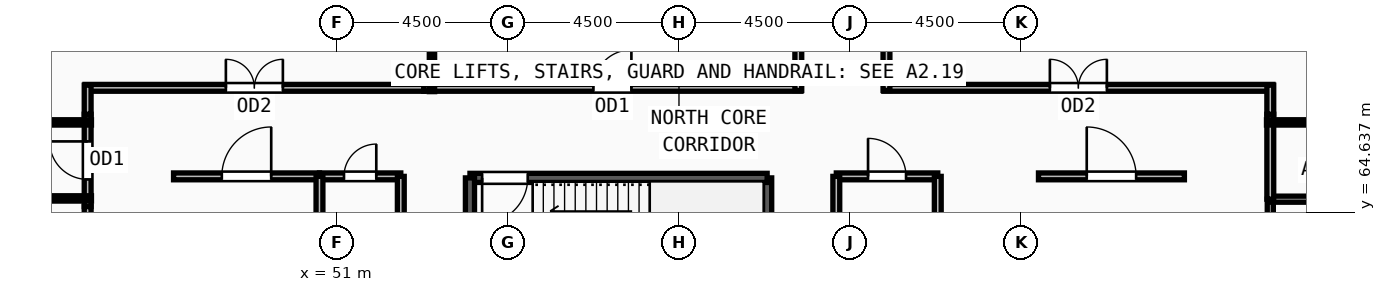
"""IFC4 building model, lengths in metres.
Left out: names, types, materials, properties, quantities, classifications, styles, units other than length and angle.
Written with IfcOpenShell. Run it as: python <this file> out.ifc"""

import sys

from ifc_helpers import new_model, si_unit, direction, frame, frame_2d, origin, place, context, subcontext, project, spatial, rectangle, extrude, source, transform, mapped, element, fill, save


model = new_model("IFC4")
c1 = context("Model", 3, precision=1e-05, world=origin(), true_north=direction((0.0, 1.0)))
c2 = subcontext(c1, "Body", "Model", "MODEL_VIEW")
j1 = project(units=[si_unit("LENGTHUNIT", "METRE"), si_unit("PLANEANGLEUNIT", "RADIAN")], contexts=[c1])
p1 = place(None, origin())
s1 = spatial("IfcSite", under=j1, at=p1, CompositionType="ELEMENT")
p2 = place(p1, origin())
s2 = spatial("IfcBuilding", under=s1, at=p2, CompositionType="ELEMENT")
p3 = place(p2, frame((0.0, 0.0, 270.0)))
s3 = spatial("IfcBuildingStorey", under=s2, at=p3, CompositionType="ELEMENT", Elevation=270.0)
p4 = place(p3, frame((62.32, 62.1, 0.0), z_axis=(0.0, 0.0, 1.0), x_axis=(0.0, 1.0, 0.0)))
e1 = element("IfcWall", 1, at=p4, inside=s3, PredefinedType="SOLIDWALL", context=c2, shape_type="SweptSolid", body=[
    extrude(rectangle(XDim=3.44, YDim=0.24, at=frame_2d((1.72, 0.0))), origin(), (0.0, 0.0, 1.0), 3.57),
])
p5 = place(p3, frame((62.32, 65.54, 0.0), z_axis=(0.0, 0.0, 1.0), x_axis=(-1.0, 0.0, 0.0)))
e2 = element("IfcWall", 2, at=p5, inside=s3, PredefinedType="SOLIDWALL", context=c2, shape_type="SweptSolid", body=[
    extrude(rectangle(XDim=7.82, YDim=0.24, at=frame_2d((3.91, 0.0))), origin(), (0.0, 0.0, 1.0), 3.57),
])
m1 = source(origin(), c2, "Body", "SweptSolid", [
    extrude(rectangle(XDim=1.2, YDim=2.2, at=frame_2d((0.6, 1.1))), frame((0.0, 0.13, 0.0), z_axis=(0.0, -1.0, 0.0), x_axis=(1.0, 0.0, 0.0)), (0.0, 0.0, 1.0), 0.26),
])
p6 = place(p5, frame((6.3, 0.0, 0.0)))
e3 = element("IfcOpeningElement", 3, at=p6, cuts=e2, PredefinedType="OPENING", context=c2, shape_type="MappedRepresentation", body=[
    mapped(m1, transform((0.0, 0.0, 0.0), x_axis=(1.0, 0.0, 0.0), y_axis=(0.0, 1.0, 0.0), z_axis=(0.0, 0.0, 1.0), scale=1.0)),
])
p7 = place(p3, frame((54.5, 65.54, 0.0), z_axis=(0.0, 0.0, 1.0), x_axis=(0.0, -1.0, 0.0)))
e4 = element("IfcWall", 4, at=p7, inside=s3, PredefinedType="SOLIDWALL", context=c2, shape_type="SweptSolid", body=[
    extrude(rectangle(XDim=3.44, YDim=0.24, at=frame_2d((1.72, 0.0))), origin(), (0.0, 0.0, 1.0), 3.57),
])
p8 = place(p3, frame((75.56, 62.24, 0.0), z_axis=(0.0, 0.0, 1.0), x_axis=(0.0, 1.0, 0.0)))
e5 = element("IfcWall", 5, at=p8, inside=s3, PredefinedType="PARTITIONING", context=c2, shape_type="SweptSolid", body=[
    extrude(rectangle(XDim=2.74, YDim=0.16, at=frame_2d((1.37, 0.0))), origin(), (0.0, 0.0, 1.0), 3.57),
])
m2 = source(origin(), c2, "Body", "SweptSolid", [
    extrude(rectangle(XDim=1.05, YDim=2.15, at=frame_2d((0.525, 1.075))), frame((0.0, 0.09, 0.0), z_axis=(0.0, -1.0, 0.0), x_axis=(1.0, 0.0, 0.0)), (0.0, 0.0, 1.0), 0.18),
])
p9 = place(p8, frame((0.845, 0.0, 0.0)))
e6 = element("IfcOpeningElement", 6, at=p9, cuts=e5, PredefinedType="OPENING", context=c2, shape_type="MappedRepresentation", body=[
    mapped(m2, transform((0.0, 0.0, 0.0), x_axis=(1.0, 0.0, 0.0), y_axis=(0.0, 1.0, 0.0), z_axis=(0.0, 0.0, 1.0), scale=1.0)),
])
p10 = place(p3, frame((50.54, 65.58, 0.0), z_axis=(0.0, 0.0, 1.0), x_axis=(1.0, 0.0, 0.0)))
e7 = element("IfcWall", 7, at=p10, inside=s3, PredefinedType="PARTITIONING", context=c2, shape_type="SweptSolid", body=[
    extrude(rectangle(XDim=2.14, YDim=0.18, at=frame_2d((1.07, 0.0))), origin(), (0.0, 0.0, 1.0), 3.57),
])
m3 = source(origin(), c2, "Body", "SweptSolid", [
    extrude(rectangle(XDim=0.85, YDim=2.1, at=frame_2d((0.425, 1.05))), frame((0.0, 0.1, 0.0), z_axis=(0.0, -1.0, 0.0), x_axis=(1.0, 0.0, 0.0)), (0.0, 0.0, 1.0), 0.2),
])
p11 = place(p10, frame((0.645, 0.0, 0.0)))
e8 = element("IfcOpeningElement", 8, at=p11, cuts=e7, PredefinedType="OPENING", context=c2, shape_type="MappedRepresentation", body=[
    mapped(m3, transform((0.0, 0.0, 0.0), x_axis=(1.0, 0.0, 0.0), y_axis=(0.0, 1.0, 0.0), z_axis=(0.0, 0.0, 1.0), scale=1.0)),
])
p12 = place(p3, frame((64.14, 65.58, 0.0), z_axis=(0.0, 0.0, 1.0), x_axis=(1.0, 0.0, 0.0)))
e9 = element("IfcWall", 9, at=p12, inside=s3, PredefinedType="PARTITIONING", context=c2, shape_type="SweptSolid", body=[
    extrude(rectangle(XDim=2.67, YDim=0.18, at=frame_2d((1.335, 0.0))), origin(), (0.0, 0.0, 1.0), 3.57),
])
m4 = source(origin(), c2, "Body", "SweptSolid", [
    extrude(rectangle(XDim=1.0, YDim=2.2, at=frame_2d((0.5, 1.1))), frame((0.0, 0.1, 0.0), z_axis=(0.0, -1.0, 0.0), x_axis=(1.0, 0.0, 0.0)), (0.0, 0.0, 1.0), 0.2),
])
p13 = place(p12, frame((0.835, 0.0, 0.0)))
e10 = element("IfcOpeningElement", 10, at=p13, cuts=e9, PredefinedType="OPENING", context=c2, shape_type="MappedRepresentation", body=[
    mapped(m4, transform((0.0, 0.0, 0.0), x_axis=(1.0, 0.0, 0.0), y_axis=(0.0, 1.0, 0.0), z_axis=(0.0, 0.0, 1.0), scale=1.0)),
])
p14 = place(p3, frame((46.7, 65.58, 0.0), z_axis=(0.0, 0.0, 1.0), x_axis=(1.0, 0.0, 0.0)))
e11 = element("IfcWall", 11, at=p14, inside=s3, PredefinedType="PARTITIONING", context=c2, shape_type="SweptSolid", body=[
    extrude(rectangle(XDim=3.84, YDim=0.18, at=frame_2d((1.92, 0.0))), origin(), (0.0, 0.0, 1.0), 3.57),
])
m5 = source(origin(), c2, "Body", "SweptSolid", [
    extrude(rectangle(XDim=1.3, YDim=2.2, at=frame_2d((0.65, 1.1))), frame((0.0, 0.1, 0.0), z_axis=(0.0, -1.0, 0.0), x_axis=(1.0, 0.0, 0.0)), (0.0, 0.0, 1.0), 0.2),
])
p15 = place(p14, frame((1.27, 0.0, 0.0)))
e12 = element("IfcOpeningElement", 12, at=p15, cuts=e11, PredefinedType="OPENING", context=c2, shape_type="MappedRepresentation", body=[
    mapped(m5, transform((0.0, 0.0, 0.0), x_axis=(1.0, 0.0, 0.0), y_axis=(0.0, 1.0, 0.0), z_axis=(0.0, 0.0, 1.0), scale=1.0)),
])
p16 = place(p3, frame((69.46, 65.58, 0.0), z_axis=(0.0, 0.0, 1.0), x_axis=(1.0, 0.0, 0.0)))
e13 = element("IfcWall", 13, at=p16, inside=s3, PredefinedType="PARTITIONING", context=c2, shape_type="SweptSolid", body=[
    extrude(rectangle(XDim=3.84, YDim=0.18, at=frame_2d((1.92, 0.0))), origin(), (0.0, 0.0, 1.0), 3.57),
])
p17 = place(p16, frame((1.27, 0.0, 0.0)))
e14 = element("IfcOpeningElement", 14, at=p17, cuts=e13, PredefinedType="OPENING", context=c2, shape_type="MappedRepresentation", body=[
    mapped(m5, transform((0.0, 0.0, 0.0), x_axis=(1.0, 0.0, 0.0), y_axis=(0.0, 1.0, 0.0), z_axis=(0.0, 0.0, 1.0), scale=1.0)),
])
p18 = place(p3, frame((65.39, 67.91, 0.0), z_axis=(0.0, 0.0, 1.0), x_axis=(1.0, 0.0, 0.0)))
e15 = element("IfcWall", 15, at=p18, inside=s3, PredefinedType="PARTITIONING", context=c2, shape_type="SweptSolid", body=[
    extrude(rectangle(XDim=10.24, YDim=0.18, at=frame_2d((5.12, 0.0))), origin(), (0.0, 0.0, 1.0), 3.205),
])
m6 = source(origin(), c2, "Body", "SweptSolid", [
    extrude(rectangle(XDim=1.5, YDim=2.2, at=frame_2d((0.75, 1.1))), frame((0.0, 0.1, 0.0), z_axis=(0.0, -1.0, 0.0), x_axis=(1.0, 0.0, 0.0)), (0.0, 0.0, 1.0), 0.2),
])
p19 = place(p18, frame((4.37, 0.0, 0.0)))
e16 = element("IfcOpeningElement", 16, at=p19, cuts=e15, PredefinedType="OPENING", context=c2, shape_type="MappedRepresentation", body=[
    mapped(m6, transform((0.0, 0.0, 0.0), x_axis=(1.0, 0.0, 0.0), y_axis=(0.0, 1.0, 0.0), z_axis=(0.0, 0.0, 1.0), scale=1.0)),
])
p20 = place(p3, frame((53.285, 67.91, 0.0), z_axis=(0.0, 0.0, 1.0), x_axis=(1.0, 0.0, 0.0)))
e17 = element("IfcWall", 17, at=p20, inside=s3, PredefinedType="PARTITIONING", context=c2, shape_type="SweptSolid", body=[
    extrude(rectangle(XDim=9.925, YDim=0.18, at=frame_2d((4.962, 0.0))), origin(), (0.0, 0.0, 1.0), 3.205),
])
p21 = place(p20, frame((4.463, 0.0, 0.0)))
e18 = element("IfcOpeningElement", 18, at=p21, cuts=e17, PredefinedType="OPENING", context=c2, shape_type="MappedRepresentation", body=[
    mapped(m4, transform((0.0, 0.0, 0.0), x_axis=(1.0, 0.0, 0.0), y_axis=(0.0, 1.0, 0.0), z_axis=(0.0, 0.0, 1.0), scale=1.0)),
])
p22 = place(p3, frame((44.37, 67.91, 0.0), z_axis=(0.0, 0.0, 1.0), x_axis=(1.0, 0.0, 0.0)))
e19 = element("IfcWall", 19, at=p22, inside=s3, PredefinedType="PARTITIONING", context=c2, shape_type="SweptSolid", body=[
    extrude(rectangle(XDim=8.915, YDim=0.18, at=frame_2d((4.458, 0.0))), origin(), (0.0, 0.0, 1.0), 3.205),
])
p23 = place(p22, frame((3.707, 0.0, 0.0)))
e20 = element("IfcOpeningElement", 20, at=p23, cuts=e19, PredefinedType="OPENING", context=c2, shape_type="MappedRepresentation", body=[
    mapped(m6, transform((0.0, 0.0, 0.0), x_axis=(1.0, 0.0, 0.0), y_axis=(0.0, 1.0, 0.0), z_axis=(0.0, 0.0, 1.0), scale=1.0)),
])
p24 = place(p3, frame((44.44, 64.785, 0.0), z_axis=(0.0, 0.0, 1.0), x_axis=(0.0, 1.0, 0.0)))
e21 = element("IfcWall", 21, at=p24, inside=s3, PredefinedType="PARTITIONING", context=c2, shape_type="SweptSolid", body=[
    extrude(rectangle(XDim=2.43, YDim=0.18, at=frame_2d((1.215, 0.0))), origin(), (0.0, 0.0, 1.0), 3.57),
])
p25 = place(p24, frame((0.715, 0.0, 0.0)))
e22 = element("IfcOpeningElement", 22, at=p25, cuts=e21, PredefinedType="OPENING", context=c2, shape_type="MappedRepresentation", body=[
    mapped(m4, transform((0.0, 0.0, 0.0), x_axis=(1.0, 0.0, 0.0), y_axis=(0.0, 1.0, 0.0), z_axis=(0.0, 0.0, 1.0), scale=1.0)),
])
p26 = place(p3, frame((44.44, 59.285, 0.0), z_axis=(0.0, 0.0, 1.0), x_axis=(0.0, 1.0, 0.0)))
e23 = element("IfcWall", 23, at=p26, inside=s3, PredefinedType="PARTITIONING", context=c2, shape_type="SweptSolid", body=[
    extrude(rectangle(XDim=5.5, YDim=0.18, at=frame_2d((2.75, 0.0))), origin(), (0.0, 0.0, 1.0), 3.57),
])
p27 = place(p26, frame((2.25, 0.0, 0.0)))
e24 = element("IfcOpeningElement", 24, at=p27, cuts=e23, PredefinedType="OPENING", context=c2, shape_type="MappedRepresentation", body=[
    mapped(m4, transform((0.0, 0.0, 0.0), x_axis=(1.0, 0.0, 0.0), y_axis=(0.0, 1.0, 0.0), z_axis=(0.0, 0.0, 1.0), scale=1.0)),
])
p28 = place(p3, frame((75.56, 64.98, 0.0), z_axis=(0.0, 0.0, 1.0), x_axis=(1.0, 0.0, 0.0)))
e25 = element("IfcWall", 25, at=p28, inside=s3, PredefinedType="PARTITIONING", context=c2, shape_type="SweptSolid", body=[
    extrude(rectangle(XDim=4.46, YDim=0.16, at=frame_2d((2.23, 0.0))), origin(), (0.0, 0.0, 1.0), 3.57),
])
p29 = place(p3, frame((50.54, 61.95, 0.0), z_axis=(0.0, 0.0, 1.0), x_axis=(0.0, 1.0, 0.0)))
e26 = element("IfcWall", 26, at=p29, inside=s3, PredefinedType="PARTITIONING", context=c2, shape_type="SweptSolid", body=[
    extrude(rectangle(XDim=3.63, YDim=0.18, at=frame_2d((1.815, 0.0))), origin(), (0.0, 0.0, 1.0), 3.57),
])
for number, where, z_axis, x_axis in (
    (27, (52.68, 61.825, 0.0), (0.0, 0.0, 1.0), (0.0, 1.0, 0.0)),
    (28, (64.14, 61.825, 0.0), (0.0, 0.0, 1.0), (0.0, 1.0, 0.0)),
    (29, (66.81, 61.825, 0.0), (0.0, 0.0, 1.0), (0.0, 1.0, 0.0)),
):
    element("IfcWall", number, at=place(p3, frame(where, z_axis=z_axis, x_axis=x_axis)), inside=s3, PredefinedType="PARTITIONING", context=c2, shape_type="SweptSolid", body=[
        extrude(rectangle(XDim=3.755, YDim=0.18, at=frame_2d((1.877, 0.0))), origin(), (0.0, 0.0, 1.0), 3.57),
    ])
p30 = place(p3, frame((75.56, 67.215, 0.0), z_axis=(0.0, 0.0, 1.0), x_axis=(0.0, -1.0, 0.0)))
e30 = element("IfcWall", 30, at=p30, inside=s3, PredefinedType="PARTITIONING", context=c2, shape_type="SweptSolid", body=[
    extrude(rectangle(XDim=2.235, YDim=0.18, at=frame_2d((1.118, 0.0))), origin(), (0.0, 0.0, 1.0), 3.57),
])
p31 = place(p3, frame((65.46, 77.202, 0.0), z_axis=(0.0, 0.0, 1.0), x_axis=(0.0, -1.0, 0.0)))
e31 = element("IfcWall", 31, at=p31, inside=s3, PredefinedType="PARTITIONING", context=c2, shape_type="SweptSolid", body=[
    extrude(rectangle(XDim=9.362, YDim=0.18, at=frame_2d((4.681, 0.0))), origin(), (0.0, 0.0, 1.0), 3.57),
])
p32 = place(p3, frame((75.56, 67.98, 0.0), z_axis=(0.0, 0.0, 1.0), x_axis=(0.0, -1.0, 0.0)))
e32 = element("IfcWall", 32, at=p32, inside=s3, PredefinedType="PARTITIONING", context=c2, shape_type="SweptSolid", body=[
    extrude(rectangle(XDim=0.765, YDim=0.18, at=frame_2d((0.382, 0.0))), origin(), (0.0, 0.0, 1.0), 3.57),
])
p33 = place(p3, frame((63.14, 67.84, 0.0), z_axis=(0.0, 0.0, 1.0), x_axis=(0.0, 1.0, 0.0)))
e33 = element("IfcWall", 33, at=p33, inside=s3, PredefinedType="PARTITIONING", context=c2, shape_type="SweptSolid", body=[
    extrude(rectangle(XDim=9.543, YDim=0.18, at=frame_2d((4.771, 0.0))), origin(), (0.0, 0.0, 1.0), 3.57),
])
p34 = place(p3, frame((44.44, 67.215, 0.0), z_axis=(0.0, 0.0, 1.0), x_axis=(0.0, 1.0, 0.0)))
e34 = element("IfcWall", 34, at=p34, inside=s3, PredefinedType="PARTITIONING", context=c2, shape_type="SweptSolid", body=[
    extrude(rectangle(XDim=0.765, YDim=0.18, at=frame_2d((0.382, 0.0))), origin(), (0.0, 0.0, 1.0), 3.57),
])
p35 = place(p3, frame((44.54, 65.0, 0.0), z_axis=(0.0, 0.0, 1.0), x_axis=(-1.0, 0.0, 0.0)))
e35 = element("IfcWall", 35, at=p35, inside=s3, PredefinedType="PARTITIONING", context=c2, shape_type="SweptSolid", body=[
    extrude(rectangle(XDim=16.001, YDim=0.14, at=frame_2d((8.0, 0.0))), origin(), (0.0, 0.0, 1.0), 2.855),
])
for number, where, z_axis, x_axis in (
    (36, (44.54, 67.0, 0.0), (0.0, 0.0, 1.0), (-1.0, 0.0, 0.0)),
    (37, (75.46, 67.0, 0.0), (0.0, 0.0, 1.0), (1.0, 0.0, 0.0)),
):
    element("IfcWall", number, at=place(p3, frame(where, z_axis=z_axis, x_axis=x_axis)), inside=s3, PredefinedType="PARTITIONING", context=c2, shape_type="SweptSolid", body=[
        extrude(rectangle(XDim=15.954, YDim=0.14, at=frame_2d((7.977, 0.0))), origin(), (0.0, 0.0, 1.0), 3.57),
    ])
p36 = place(p3, frame((53.5, 67.81, 0.0), z_axis=(0.0, 0.0, 1.0), x_axis=(0.0, 1.0, 0.0)))
e38 = element("IfcWall", 38, at=p36, inside=s3, PredefinedType="PARTITIONING", context=c2, shape_type="SweptSolid", body=[
    extrude(rectangle(XDim=9.139, YDim=0.14, at=frame_2d((4.569, 0.0))), origin(), (0.0, 0.0, 1.0), 3.57),
])
m7 = source(origin(), c2, "Body", "SweptSolid", [
    extrude(rectangle(XDim=1.2, YDim=2.2, at=frame_2d((0.6, 1.1))), frame((0.0, 0.025, 0.0), z_axis=(0.0, -1.0, 0.0), x_axis=(1.0, 0.0, 0.0)), (0.0, 0.0, 1.0), 0.05),
])
p37 = place(p6, origin())
e39 = element("IfcDoor", 39, at=p37, inside=s3, OperationType="SINGLE_SWING_RIGHT", PredefinedType="DOOR", context=c2, shape_type="MappedRepresentation", body=[
    mapped(m7, transform((0.0, 0.0, 0.0), x_axis=(1.0, 0.0, 0.0), y_axis=(0.0, 1.0, 0.0), z_axis=(0.0, 0.0, 1.0), scale=1.0)),
])
fill(e3, e39)
m8 = source(origin(), c2, "Body", "SweptSolid", [
    extrude(rectangle(XDim=0.85, YDim=2.1, at=frame_2d((0.425, 1.05))), frame((0.0, 0.025, 0.0), z_axis=(0.0, -1.0, 0.0), x_axis=(1.0, 0.0, 0.0)), (0.0, 0.0, 1.0), 0.05),
])
p38 = place(p11, origin())
e40 = element("IfcDoor", 40, at=p38, inside=s3, OperationType="SINGLE_SWING_RIGHT", PredefinedType="DOOR", context=c2, shape_type="MappedRepresentation", body=[
    mapped(m8, transform((0.0, 0.0, 0.0), x_axis=(1.0, 0.0, 0.0), y_axis=(0.0, 1.0, 0.0), z_axis=(0.0, 0.0, 1.0), scale=1.0)),
])
fill(e8, e40)
m9 = source(origin(), c2, "Body", "SweptSolid", [
    extrude(rectangle(XDim=1.0, YDim=2.2, at=frame_2d((0.5, 1.1))), frame((0.0, 0.025, 0.0), z_axis=(0.0, -1.0, 0.0), x_axis=(1.0, 0.0, 0.0)), (0.0, 0.0, 1.0), 0.05),
])
p39 = place(p13, origin())
e41 = element("IfcDoor", 41, at=p39, inside=s3, OperationType="SINGLE_SWING_LEFT", PredefinedType="DOOR", context=c2, shape_type="MappedRepresentation", body=[
    mapped(m9, transform((0.0, 0.0, 0.0), x_axis=(1.0, 0.0, 0.0), y_axis=(0.0, 1.0, 0.0), z_axis=(0.0, 0.0, 1.0), scale=1.0)),
])
fill(e10, e41)
m10 = source(origin(), c2, "Body", "SweptSolid", [
    extrude(rectangle(XDim=1.3, YDim=2.2, at=frame_2d((0.65, 1.1))), frame((0.0, 0.025, 0.0), z_axis=(0.0, -1.0, 0.0), x_axis=(1.0, 0.0, 0.0)), (0.0, 0.0, 1.0), 0.05),
])
p40 = place(p15, origin())
e42 = element("IfcDoor", 42, at=p40, inside=s3, OperationType="SINGLE_SWING_RIGHT", PredefinedType="DOOR", context=c2, shape_type="MappedRepresentation", body=[
    mapped(m10, transform((0.0, 0.0, 0.0), x_axis=(1.0, 0.0, 0.0), y_axis=(0.0, 1.0, 0.0), z_axis=(0.0, 0.0, 1.0), scale=1.0)),
])
fill(e12, e42)
p41 = place(p17, origin())
e43 = element("IfcDoor", 43, at=p41, inside=s3, OperationType="SINGLE_SWING_LEFT", PredefinedType="DOOR", context=c2, shape_type="MappedRepresentation", body=[
    mapped(m10, transform((0.0, 0.0, 0.0), x_axis=(1.0, 0.0, 0.0), y_axis=(0.0, 1.0, 0.0), z_axis=(0.0, 0.0, 1.0), scale=1.0)),
])
fill(e14, e43)
m11 = source(origin(), c2, "Body", "SweptSolid", [
    extrude(rectangle(XDim=1.5, YDim=2.2, at=frame_2d((0.75, 1.1))), frame((0.0, 0.025, 0.0), z_axis=(0.0, -1.0, 0.0), x_axis=(1.0, 0.0, 0.0)), (0.0, 0.0, 1.0), 0.05),
])
p42 = place(p19, origin())
e44 = element("IfcDoor", 44, at=p42, inside=s3, OperationType="DOUBLE_DOOR_SINGLE_SWING", PredefinedType="DOOR", context=c2, shape_type="MappedRepresentation", body=[
    mapped(m11, transform((0.0, 0.0, 0.0), x_axis=(1.0, 0.0, 0.0), y_axis=(0.0, 1.0, 0.0), z_axis=(0.0, 0.0, 1.0), scale=1.0)),
])
fill(e16, e44)
p43 = place(p21, origin())
e45 = element("IfcDoor", 45, at=p43, inside=s3, OperationType="SINGLE_SWING_RIGHT", PredefinedType="DOOR", context=c2, shape_type="MappedRepresentation", body=[
    mapped(m9, transform((0.0, 0.0, 0.0), x_axis=(1.0, 0.0, 0.0), y_axis=(0.0, 1.0, 0.0), z_axis=(0.0, 0.0, 1.0), scale=1.0)),
])
fill(e18, e45)
p44 = place(p23, origin())
e46 = element("IfcDoor", 46, at=p44, inside=s3, OperationType="DOUBLE_DOOR_SINGLE_SWING", PredefinedType="DOOR", context=c2, shape_type="MappedRepresentation", body=[
    mapped(m11, transform((0.0, 0.0, 0.0), x_axis=(1.0, 0.0, 0.0), y_axis=(0.0, 1.0, 0.0), z_axis=(0.0, 0.0, 1.0), scale=1.0)),
])
fill(e20, e46)
p45 = place(p25, origin())
e47 = element("IfcDoor", 47, at=p45, inside=s3, OperationType="SINGLE_SWING_RIGHT", PredefinedType="DOOR", context=c2, shape_type="MappedRepresentation", body=[
    mapped(m9, transform((0.0, 0.0, 0.0), x_axis=(1.0, 0.0, 0.0), y_axis=(0.0, 1.0, 0.0), z_axis=(0.0, 0.0, 1.0), scale=1.0)),
])
fill(e22, e47)
save(model, sys.argv[1])
